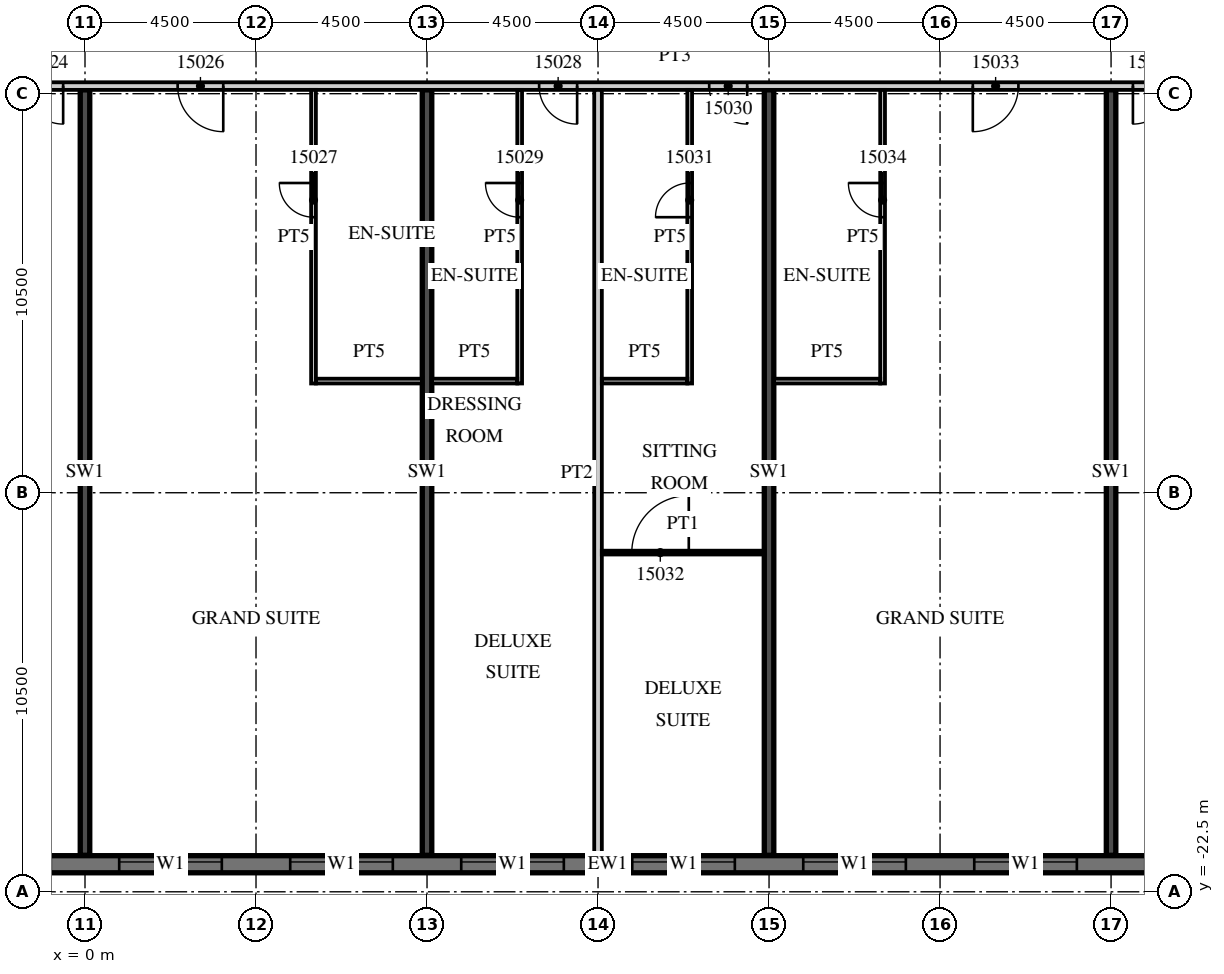
"""IFC4 building model, lengths in metres.
Left out: names, types, materials, properties, quantities, classifications, styles, units other than length and angle.
Written with IfcOpenShell. Run it as: python <this file> out.ifc"""

import sys

from ifc_helpers import new_model, si_unit, direction, frame, frame_2d, origin, place, context, subcontext, project, spatial, rectangle, extrude, element, fill, save


model = new_model("IFC4")
c1 = context("Model", 3, precision=1e-05, world=origin(), true_north=direction((0.0, 1.0)))
c2 = subcontext(c1, "Body", "Model", "MODEL_VIEW")
j1 = project(units=[si_unit("LENGTHUNIT", "METRE"), si_unit("PLANEANGLEUNIT", "RADIAN")], contexts=[c1])
p1 = place(None, origin())
s1 = spatial("IfcSite", under=j1, at=p1, CompositionType="ELEMENT")
p2 = place(p1, origin())
s2 = spatial("IfcBuilding", under=s1, at=p2, CompositionType="ELEMENT")
p3 = place(p2, frame((0.0, 0.0, 79.8)))
s3 = spatial("IfcBuildingStorey", under=s2, at=p3, CompositionType="ELEMENT", Elevation=79.8)
for number, where, z_axis, x_axis in (
    (1, (0.0, -21.54, 0.0), (0.0, 0.0, 1.0), (0.0, 1.0, 0.0)),
    (2, (9.0, -21.54, 0.0), (0.0, 0.0, 1.0), (0.0, 1.0, 0.0)),
    (3, (18.0, -21.54, 0.0), (0.0, 0.0, 1.0), (0.0, 1.0, 0.0)),
    (4, (27.0, -21.54, 0.0), (0.0, 0.0, 1.0), (0.0, 1.0, 0.0)),
):
    element("IfcWall", number, at=place(p3, frame(where, z_axis=z_axis, x_axis=x_axis)), inside=s3, PredefinedType="SHEAR", context=c2, shape_type="SweptSolid", body=[
        extrude(rectangle(XDim=20.14, YDim=0.25, at=frame_2d((10.07, 0.0))), origin(), (0.0, 0.0, 1.0), 3.3),
    ])
p4 = place(p3, frame((-13.5, -21.775, 0.0), z_axis=(0.0, 0.0, 1.0), x_axis=(1.0, 0.0, 0.0)))
e5 = element("IfcWall", 5, at=p4, inside=s3, PredefinedType="SOLIDWALL", context=c2, shape_type="SweptSolid", body=[
    extrude(rectangle(XDim=54.5, YDim=0.45, at=frame_2d((27.25, 0.0))), origin(), (0.0, 0.0, 1.0), 3.02),
])
p5 = place(p4, frame((0.9, 0.0, 0.45)))
e6 = element("IfcOpeningElement", 6, at=p5, cuts=e5, PredefinedType="OPENING", context=c2, shape_type="SweptSolid", body=[
    extrude(rectangle(XDim=2.7, YDim=2.25, at=frame_2d((1.35, 1.125))), frame((0.0, 0.235, 0.0), z_axis=(0.0, -1.0, 0.0), x_axis=(1.0, 0.0, 0.0)), (0.0, 0.0, 1.0), 0.47),
])
p6 = place(p4, frame((5.4, 0.0, 0.45)))
e7 = element("IfcOpeningElement", 7, at=p6, cuts=e5, PredefinedType="OPENING", context=c2, shape_type="SweptSolid", body=[
    extrude(rectangle(XDim=2.7, YDim=2.25, at=frame_2d((1.35, 1.125))), frame((0.0, 0.235, 0.0), z_axis=(0.0, -1.0, 0.0), x_axis=(1.0, 0.0, 0.0)), (0.0, 0.0, 1.0), 0.47),
])
p7 = place(p4, frame((9.9, 0.0, 0.45)))
e8 = element("IfcOpeningElement", 8, at=p7, cuts=e5, PredefinedType="OPENING", context=c2, shape_type="SweptSolid", body=[
    extrude(rectangle(XDim=2.7, YDim=2.25, at=frame_2d((1.35, 1.125))), frame((0.0, 0.235, 0.0), z_axis=(0.0, -1.0, 0.0), x_axis=(1.0, 0.0, 0.0)), (0.0, 0.0, 1.0), 0.47),
])
p8 = place(p4, frame((14.4, 0.0, 0.45)))
e9 = element("IfcOpeningElement", 9, at=p8, cuts=e5, PredefinedType="OPENING", context=c2, shape_type="SweptSolid", body=[
    extrude(rectangle(XDim=2.7, YDim=2.25, at=frame_2d((1.35, 1.125))), frame((0.0, 0.235, 0.0), z_axis=(0.0, -1.0, 0.0), x_axis=(1.0, 0.0, 0.0)), (0.0, 0.0, 1.0), 0.47),
])
p9 = place(p4, frame((18.9, 0.0, 0.45)))
e10 = element("IfcOpeningElement", 10, at=p9, cuts=e5, PredefinedType="OPENING", context=c2, shape_type="SweptSolid", body=[
    extrude(rectangle(XDim=2.7, YDim=2.25, at=frame_2d((1.35, 1.125))), frame((0.0, 0.235, 0.0), z_axis=(0.0, -1.0, 0.0), x_axis=(1.0, 0.0, 0.0)), (0.0, 0.0, 1.0), 0.47),
])
p10 = place(p4, frame((23.4, 0.0, 0.45)))
e11 = element("IfcOpeningElement", 11, at=p10, cuts=e5, PredefinedType="OPENING", context=c2, shape_type="SweptSolid", body=[
    extrude(rectangle(XDim=2.7, YDim=2.25, at=frame_2d((1.35, 1.125))), frame((0.0, 0.235, 0.0), z_axis=(0.0, -1.0, 0.0), x_axis=(1.0, 0.0, 0.0)), (0.0, 0.0, 1.0), 0.47),
])
p11 = place(p4, frame((27.9, 0.0, 0.45)))
e12 = element("IfcOpeningElement", 12, at=p11, cuts=e5, PredefinedType="OPENING", context=c2, shape_type="SweptSolid", body=[
    extrude(rectangle(XDim=2.7, YDim=2.25, at=frame_2d((1.35, 1.125))), frame((0.0, 0.235, 0.0), z_axis=(0.0, -1.0, 0.0), x_axis=(1.0, 0.0, 0.0)), (0.0, 0.0, 1.0), 0.47),
])
p12 = place(p4, frame((32.4, 0.0, 0.45)))
e13 = element("IfcOpeningElement", 13, at=p12, cuts=e5, PredefinedType="OPENING", context=c2, shape_type="SweptSolid", body=[
    extrude(rectangle(XDim=2.7, YDim=2.25, at=frame_2d((1.35, 1.125))), frame((0.0, 0.235, 0.0), z_axis=(0.0, -1.0, 0.0), x_axis=(1.0, 0.0, 0.0)), (0.0, 0.0, 1.0), 0.47),
])
p13 = place(p4, frame((36.9, 0.0, 0.45)))
e14 = element("IfcOpeningElement", 14, at=p13, cuts=e5, PredefinedType="OPENING", context=c2, shape_type="SweptSolid", body=[
    extrude(rectangle(XDim=2.7, YDim=2.25, at=frame_2d((1.35, 1.125))), frame((0.0, 0.235, 0.0), z_axis=(0.0, -1.0, 0.0), x_axis=(1.0, 0.0, 0.0)), (0.0, 0.0, 1.0), 0.47),
])
p14 = place(p4, frame((41.4, 0.0, 0.45)))
e15 = element("IfcOpeningElement", 15, at=p14, cuts=e5, PredefinedType="OPENING", context=c2, shape_type="SweptSolid", body=[
    extrude(rectangle(XDim=2.7, YDim=2.25, at=frame_2d((1.35, 1.125))), frame((0.0, 0.235, 0.0), z_axis=(0.0, -1.0, 0.0), x_axis=(1.0, 0.0, 0.0)), (0.0, 0.0, 1.0), 0.47),
])
p15 = place(p4, frame((45.9, 0.0, 0.45)))
e16 = element("IfcOpeningElement", 16, at=p15, cuts=e5, PredefinedType="OPENING", context=c2, shape_type="SweptSolid", body=[
    extrude(rectangle(XDim=2.7, YDim=2.25, at=frame_2d((1.35, 1.125))), frame((0.0, 0.235, 0.0), z_axis=(0.0, -1.0, 0.0), x_axis=(1.0, 0.0, 0.0)), (0.0, 0.0, 1.0), 0.47),
])
p16 = place(p4, frame((50.4, 0.0, 0.45)))
e17 = element("IfcOpeningElement", 17, at=p16, cuts=e5, PredefinedType="OPENING", context=c2, shape_type="SweptSolid", body=[
    extrude(rectangle(XDim=2.7, YDim=2.25, at=frame_2d((1.35, 1.125))), frame((0.0, 0.235, 0.0), z_axis=(0.0, -1.0, 0.0), x_axis=(1.0, 0.0, 0.0)), (0.0, 0.0, 1.0), 0.47),
])
p17 = place(p3, frame((-13.5, -1.3, 0.0), z_axis=(0.0, 0.0, 1.0), x_axis=(1.0, 0.0, 0.0)))
e18 = element("IfcWall", 18, at=p17, inside=s3, PredefinedType="PARTITIONING", context=c2, shape_type="SweptSolid", body=[
    extrude(rectangle(XDim=58.05, YDim=0.2, at=frame_2d((29.025, 0.0))), origin(), (0.0, 0.0, 1.0), 3.02),
])
p18 = place(p17, frame((2.925, 0.0, 0.0)))
e19 = element("IfcOpeningElement", 19, at=p18, cuts=e18, PredefinedType="OPENING", context=c2, shape_type="SweptSolid", body=[
    extrude(rectangle(XDim=1.0, YDim=2.1, at=frame_2d((0.5, 1.05))), frame((0.0, 0.11, 0.0), z_axis=(0.0, -1.0, 0.0), x_axis=(1.0, 0.0, 0.0)), (0.0, 0.0, 1.0), 0.22),
])
p19 = place(p17, frame((7.45, 0.0, 0.0)))
e20 = element("IfcOpeningElement", 20, at=p19, cuts=e18, PredefinedType="OPENING", context=c2, shape_type="SweptSolid", body=[
    extrude(rectangle(XDim=1.0, YDim=2.1, at=frame_2d((0.5, 1.05))), frame((0.0, 0.11, 0.0), z_axis=(0.0, -1.0, 0.0), x_axis=(1.0, 0.0, 0.0)), (0.0, 0.0, 1.0), 0.22),
])
p20 = place(p17, frame((11.925, 0.0, 0.0)))
e21 = element("IfcOpeningElement", 21, at=p20, cuts=e18, PredefinedType="OPENING", context=c2, shape_type="SweptSolid", body=[
    extrude(rectangle(XDim=1.0, YDim=2.1, at=frame_2d((0.5, 1.05))), frame((0.0, 0.11, 0.0), z_axis=(0.0, -1.0, 0.0), x_axis=(1.0, 0.0, 0.0)), (0.0, 0.0, 1.0), 0.22),
])
p21 = place(p17, frame((15.938, 0.0, 0.0)))
e22 = element("IfcOpeningElement", 22, at=p21, cuts=e18, PredefinedType="OPENING", context=c2, shape_type="SweptSolid", body=[
    extrude(rectangle(XDim=1.2, YDim=2.1, at=frame_2d((0.6, 1.05))), frame((0.0, 0.11, 0.0), z_axis=(0.0, -1.0, 0.0), x_axis=(1.0, 0.0, 0.0)), (0.0, 0.0, 1.0), 0.22),
])
p22 = place(p17, frame((25.45, 0.0, 0.0)))
e23 = element("IfcOpeningElement", 23, at=p22, cuts=e18, PredefinedType="OPENING", context=c2, shape_type="SweptSolid", body=[
    extrude(rectangle(XDim=1.0, YDim=2.1, at=frame_2d((0.5, 1.05))), frame((0.0, 0.11, 0.0), z_axis=(0.0, -1.0, 0.0), x_axis=(1.0, 0.0, 0.0)), (0.0, 0.0, 1.0), 0.22),
])
p23 = place(p17, frame((29.925, 0.0, 0.0)))
e24 = element("IfcOpeningElement", 24, at=p23, cuts=e18, PredefinedType="OPENING", context=c2, shape_type="SweptSolid", body=[
    extrude(rectangle(XDim=1.0, YDim=2.1, at=frame_2d((0.5, 1.05))), frame((0.0, 0.11, 0.0), z_axis=(0.0, -1.0, 0.0), x_axis=(1.0, 0.0, 0.0)), (0.0, 0.0, 1.0), 0.22),
])
p24 = place(p17, frame((36.862, 0.0, 0.0)))
e25 = element("IfcOpeningElement", 25, at=p24, cuts=e18, PredefinedType="OPENING", context=c2, shape_type="SweptSolid", body=[
    extrude(rectangle(XDim=1.2, YDim=2.1, at=frame_2d((0.6, 1.05))), frame((0.0, 0.11, 0.0), z_axis=(0.0, -1.0, 0.0), x_axis=(1.0, 0.0, 0.0)), (0.0, 0.0, 1.0), 0.22),
])
p25 = place(p17, frame((41.075, 0.0, 0.0)))
e26 = element("IfcOpeningElement", 26, at=p25, cuts=e18, PredefinedType="OPENING", context=c2, shape_type="SweptSolid", body=[
    extrude(rectangle(XDim=1.0, YDim=2.1, at=frame_2d((0.5, 1.05))), frame((0.0, 0.11, 0.0), z_axis=(0.0, -1.0, 0.0), x_axis=(1.0, 0.0, 0.0)), (0.0, 0.0, 1.0), 0.22),
])
p26 = place(p17, frame((45.55, 0.0, 0.0)))
e27 = element("IfcOpeningElement", 27, at=p26, cuts=e18, PredefinedType="OPENING", context=c2, shape_type="SweptSolid", body=[
    extrude(rectangle(XDim=1.0, YDim=2.1, at=frame_2d((0.5, 1.05))), frame((0.0, 0.11, 0.0), z_axis=(0.0, -1.0, 0.0), x_axis=(1.0, 0.0, 0.0)), (0.0, 0.0, 1.0), 0.22),
])
p27 = place(p17, frame((52.425, 0.0, 0.0)))
e28 = element("IfcOpeningElement", 28, at=p27, cuts=e18, PredefinedType="OPENING", context=c2, shape_type="SweptSolid", body=[
    extrude(rectangle(XDim=1.0, YDim=2.1, at=frame_2d((0.5, 1.05))), frame((0.0, 0.11, 0.0), z_axis=(0.0, -1.0, 0.0), x_axis=(1.0, 0.0, 0.0)), (0.0, 0.0, 1.0), 0.22),
])
p28 = place(p17, frame((56.525, 0.0, 0.0)))
e29 = element("IfcOpeningElement", 29, at=p28, cuts=e18, PredefinedType="OPENING", context=c2, shape_type="SweptSolid", body=[
    extrude(rectangle(XDim=1.0, YDim=2.1, at=frame_2d((0.5, 1.05))), frame((0.0, 0.11, 0.0), z_axis=(0.0, -1.0, 0.0), x_axis=(1.0, 0.0, 0.0)), (0.0, 0.0, 1.0), 0.22),
])
p29 = place(p3, frame((6.013, -9.125, 0.0), z_axis=(0.0, 0.0, 1.0), x_axis=(0.0, 1.0, 0.0)))
e30 = element("IfcWall", 30, at=p29, inside=s3, PredefinedType="PARTITIONING", context=c2, shape_type="SweptSolid", body=[
    extrude(rectangle(XDim=7.725, YDim=0.125, at=frame_2d((3.863, 0.0))), origin(), (0.0, 0.0, 1.0), 3.02),
])
p30 = place(p29, frame((4.375, 0.0, 0.0)))
e31 = element("IfcOpeningElement", 31, at=p30, cuts=e30, PredefinedType="OPENING", context=c2, shape_type="SweptSolid", body=[
    extrude(rectangle(XDim=0.9, YDim=2.1, at=frame_2d((0.45, 1.05))), frame((0.0, 0.073, 0.0), z_axis=(0.0, -1.0, 0.0), x_axis=(1.0, 0.0, 0.0)), (0.0, 0.0, 1.0), 0.145),
])
p31 = place(p3, frame((6.075, -9.062, 0.0), z_axis=(0.0, 0.0, 1.0), x_axis=(1.0, 0.0, 0.0)))
e32 = element("IfcWall", 32, at=p31, inside=s3, PredefinedType="PARTITIONING", context=c2, shape_type="SweptSolid", body=[
    extrude(rectangle(XDim=2.8, YDim=0.125, at=frame_2d((1.4, 0.0))), origin(), (0.0, 0.0, 1.0), 3.02),
])
p32 = place(p3, frame((13.5, -21.55, 0.0), z_axis=(0.0, 0.0, 1.0), x_axis=(0.0, 1.0, 0.0)))
e33 = element("IfcWall", 33, at=p32, inside=s3, PredefinedType="PARTITIONING", context=c2, shape_type="SweptSolid", body=[
    extrude(rectangle(XDim=20.15, YDim=0.2, at=frame_2d((10.075, 0.0))), origin(), (0.0, 0.0, 1.0), 3.02),
])
p33 = place(p3, frame((11.438, -9.125, 0.0), z_axis=(0.0, 0.0, 1.0), x_axis=(0.0, 1.0, 0.0)))
e34 = element("IfcWall", 34, at=p33, inside=s3, PredefinedType="PARTITIONING", context=c2, shape_type="SweptSolid", body=[
    extrude(rectangle(XDim=7.725, YDim=0.125, at=frame_2d((3.863, 0.0))), origin(), (0.0, 0.0, 1.0), 3.02),
])
p34 = place(p33, frame((4.375, 0.0, 0.0)))
e35 = element("IfcOpeningElement", 35, at=p34, cuts=e34, PredefinedType="OPENING", context=c2, shape_type="SweptSolid", body=[
    extrude(rectangle(XDim=0.9, YDim=2.1, at=frame_2d((0.45, 1.05))), frame((0.0, 0.073, 0.0), z_axis=(0.0, -1.0, 0.0), x_axis=(1.0, 0.0, 0.0)), (0.0, 0.0, 1.0), 0.145),
])
p35 = place(p3, frame((9.125, -9.062, 0.0), z_axis=(0.0, 0.0, 1.0), x_axis=(1.0, 0.0, 0.0)))
e36 = element("IfcWall", 36, at=p35, inside=s3, PredefinedType="PARTITIONING", context=c2, shape_type="SweptSolid", body=[
    extrude(rectangle(XDim=2.25, YDim=0.125, at=frame_2d((1.125, 0.0))), origin(), (0.0, 0.0, 1.0), 3.02),
])
p36 = place(p3, frame((15.912, -9.125, 0.0), z_axis=(0.0, 0.0, 1.0), x_axis=(0.0, 1.0, 0.0)))
e37 = element("IfcWall", 37, at=p36, inside=s3, PredefinedType="PARTITIONING", context=c2, shape_type="SweptSolid", body=[
    extrude(rectangle(XDim=7.725, YDim=0.125, at=frame_2d((3.863, 0.0))), origin(), (0.0, 0.0, 1.0), 3.02),
])
p37 = place(p36, frame((4.375, 0.0, 0.0)))
e38 = element("IfcOpeningElement", 38, at=p37, cuts=e37, PredefinedType="OPENING", context=c2, shape_type="SweptSolid", body=[
    extrude(rectangle(XDim=0.9, YDim=2.1, at=frame_2d((0.45, 1.05))), frame((0.0, 0.073, 0.0), z_axis=(0.0, -1.0, 0.0), x_axis=(1.0, 0.0, 0.0)), (0.0, 0.0, 1.0), 0.145),
])
p38 = place(p3, frame((13.6, -9.062, 0.0), z_axis=(0.0, 0.0, 1.0), x_axis=(1.0, 0.0, 0.0)))
e39 = element("IfcWall", 39, at=p38, inside=s3, PredefinedType="PARTITIONING", context=c2, shape_type="SweptSolid", body=[
    extrude(rectangle(XDim=2.25, YDim=0.125, at=frame_2d((1.125, 0.0))), origin(), (0.0, 0.0, 1.0), 3.02),
])
p39 = place(p3, frame((13.6, -13.575, 0.0), z_axis=(0.0, 0.0, 1.0), x_axis=(1.0, 0.0, 0.0)))
e40 = element("IfcWall", 40, at=p39, inside=s3, PredefinedType="PARTITIONING", context=c2, shape_type="SweptSolid", body=[
    extrude(rectangle(XDim=4.275, YDim=0.1, at=frame_2d((2.137, 0.0))), origin(), (0.0, 0.0, 1.0), 3.02),
])
p40 = place(p39, frame((0.788, 0.0, 0.0)))
e41 = element("IfcOpeningElement", 41, at=p40, cuts=e40, PredefinedType="OPENING", context=c2, shape_type="SweptSolid", body=[
    extrude(rectangle(XDim=1.5, YDim=2.1, at=frame_2d((0.75, 1.05))), frame((0.0, 0.06, 0.0), z_axis=(0.0, -1.0, 0.0), x_axis=(1.0, 0.0, 0.0)), (0.0, 0.0, 1.0), 0.12),
])
p41 = place(p3, frame((20.988, -9.125, 0.0), z_axis=(0.0, 0.0, 1.0), x_axis=(0.0, 1.0, 0.0)))
e42 = element("IfcWall", 42, at=p41, inside=s3, PredefinedType="PARTITIONING", context=c2, shape_type="SweptSolid", body=[
    extrude(rectangle(XDim=7.725, YDim=0.125, at=frame_2d((3.863, 0.0))), origin(), (0.0, 0.0, 1.0), 3.02),
])
p42 = place(p41, frame((4.375, 0.0, 0.0)))
e43 = element("IfcOpeningElement", 43, at=p42, cuts=e42, PredefinedType="OPENING", context=c2, shape_type="SweptSolid", body=[
    extrude(rectangle(XDim=0.9, YDim=2.1, at=frame_2d((0.45, 1.05))), frame((0.0, 0.073, 0.0), z_axis=(0.0, -1.0, 0.0), x_axis=(1.0, 0.0, 0.0)), (0.0, 0.0, 1.0), 0.145),
])
p43 = place(p3, frame((18.125, -9.062, 0.0), z_axis=(0.0, 0.0, 1.0), x_axis=(1.0, 0.0, 0.0)))
e44 = element("IfcWall", 44, at=p43, inside=s3, PredefinedType="PARTITIONING", context=c2, shape_type="SweptSolid", body=[
    extrude(rectangle(XDim=2.8, YDim=0.125, at=frame_2d((1.4, 0.0))), origin(), (0.0, 0.0, 1.0), 3.02),
])
p44 = place(p8, origin())
e45 = element("IfcWindow", 45, at=p44, inside=s3, PartitioningType="SINGLE_PANEL", PredefinedType="WINDOW", context=c2, shape_type="SweptSolid", body=[
    extrude(rectangle(XDim=2.7, YDim=2.25, at=frame_2d((1.35, 1.125))), frame((0.0, 0.09, 0.0), z_axis=(0.0, -1.0, 0.0), x_axis=(1.0, 0.0, 0.0)), (0.0, 0.0, 1.0), 0.06),
])
fill(e9, e45)
p45 = place(p9, origin())
e46 = element("IfcWindow", 46, at=p45, inside=s3, PartitioningType="SINGLE_PANEL", PredefinedType="WINDOW", context=c2, shape_type="SweptSolid", body=[
    extrude(rectangle(XDim=2.7, YDim=2.25, at=frame_2d((1.35, 1.125))), frame((0.0, 0.09, 0.0), z_axis=(0.0, -1.0, 0.0), x_axis=(1.0, 0.0, 0.0)), (0.0, 0.0, 1.0), 0.06),
])
fill(e10, e46)
p46 = place(p10, origin())
e47 = element("IfcWindow", 47, at=p46, inside=s3, PartitioningType="SINGLE_PANEL", PredefinedType="WINDOW", context=c2, shape_type="SweptSolid", body=[
    extrude(rectangle(XDim=2.7, YDim=2.25, at=frame_2d((1.35, 1.125))), frame((0.0, 0.09, 0.0), z_axis=(0.0, -1.0, 0.0), x_axis=(1.0, 0.0, 0.0)), (0.0, 0.0, 1.0), 0.06),
])
fill(e11, e47)
p47 = place(p11, origin())
e48 = element("IfcWindow", 48, at=p47, inside=s3, PartitioningType="SINGLE_PANEL", PredefinedType="WINDOW", context=c2, shape_type="SweptSolid", body=[
    extrude(rectangle(XDim=2.7, YDim=2.25, at=frame_2d((1.35, 1.125))), frame((0.0, 0.09, 0.0), z_axis=(0.0, -1.0, 0.0), x_axis=(1.0, 0.0, 0.0)), (0.0, 0.0, 1.0), 0.06),
])
fill(e12, e48)
p48 = place(p12, origin())
e49 = element("IfcWindow", 49, at=p48, inside=s3, PartitioningType="SINGLE_PANEL", PredefinedType="WINDOW", context=c2, shape_type="SweptSolid", body=[
    extrude(rectangle(XDim=2.7, YDim=2.25, at=frame_2d((1.35, 1.125))), frame((0.0, 0.09, 0.0), z_axis=(0.0, -1.0, 0.0), x_axis=(1.0, 0.0, 0.0)), (0.0, 0.0, 1.0), 0.06),
])
fill(e13, e49)
p49 = place(p13, origin())
e50 = element("IfcWindow", 50, at=p49, inside=s3, PartitioningType="SINGLE_PANEL", PredefinedType="WINDOW", context=c2, shape_type="SweptSolid", body=[
    extrude(rectangle(XDim=2.7, YDim=2.25, at=frame_2d((1.35, 1.125))), frame((0.0, 0.09, 0.0), z_axis=(0.0, -1.0, 0.0), x_axis=(1.0, 0.0, 0.0)), (0.0, 0.0, 1.0), 0.06),
])
fill(e14, e50)
p50 = place(p20, origin())
e51 = element("IfcDoor", 51, at=p50, inside=s3, OperationType="SINGLE_SWING_RIGHT", PredefinedType="DOOR", context=c2, shape_type="SweptSolid", body=[
    extrude(rectangle(XDim=1.0, YDim=2.1, at=frame_2d((0.5, 1.05))), frame((0.0, 0.025, 0.0), z_axis=(0.0, -1.0, 0.0), x_axis=(1.0, 0.0, 0.0)), (0.0, 0.0, 1.0), 0.05),
])
fill(e21, e51)
p51 = place(p21, origin())
e52 = element("IfcDoor", 52, at=p51, inside=s3, OperationType="SINGLE_SWING_RIGHT", PredefinedType="DOOR", context=c2, shape_type="SweptSolid", body=[
    extrude(rectangle(XDim=1.2, YDim=2.1, at=frame_2d((0.6, 1.05))), frame((0.0, 0.025, 0.0), z_axis=(0.0, -1.0, 0.0), x_axis=(1.0, 0.0, 0.0)), (0.0, 0.0, 1.0), 0.05),
])
fill(e22, e52)
p52 = place(p30, origin())
e53 = element("IfcDoor", 53, at=p52, inside=s3, OperationType="SINGLE_SWING_RIGHT", PredefinedType="DOOR", context=c2, shape_type="SweptSolid", body=[
    extrude(rectangle(XDim=0.9, YDim=2.1, at=frame_2d((0.45, 1.05))), frame((0.0, 0.025, 0.0), z_axis=(0.0, -1.0, 0.0), x_axis=(1.0, 0.0, 0.0)), (0.0, 0.0, 1.0), 0.05),
])
fill(e31, e53)
p53 = place(p22, origin())
e54 = element("IfcDoor", 54, at=p53, inside=s3, OperationType="SINGLE_SWING_RIGHT", PredefinedType="DOOR", context=c2, shape_type="SweptSolid", body=[
    extrude(rectangle(XDim=1.0, YDim=2.1, at=frame_2d((0.5, 1.05))), frame((0.0, 0.025, 0.0), z_axis=(0.0, -1.0, 0.0), x_axis=(1.0, 0.0, 0.0)), (0.0, 0.0, 1.0), 0.05),
])
fill(e23, e54)
p54 = place(p34, origin())
e55 = element("IfcDoor", 55, at=p54, inside=s3, OperationType="SINGLE_SWING_RIGHT", PredefinedType="DOOR", context=c2, shape_type="SweptSolid", body=[
    extrude(rectangle(XDim=0.9, YDim=2.1, at=frame_2d((0.45, 1.05))), frame((0.0, 0.025, 0.0), z_axis=(0.0, -1.0, 0.0), x_axis=(1.0, 0.0, 0.0)), (0.0, 0.0, 1.0), 0.05),
])
fill(e35, e55)
p55 = place(p23, origin())
e56 = element("IfcDoor", 56, at=p55, inside=s3, OperationType="SINGLE_SWING_RIGHT", PredefinedType="DOOR", context=c2, shape_type="SweptSolid", body=[
    extrude(rectangle(XDim=1.0, YDim=2.1, at=frame_2d((0.5, 1.05))), frame((0.0, 0.025, 0.0), z_axis=(0.0, -1.0, 0.0), x_axis=(1.0, 0.0, 0.0)), (0.0, 0.0, 1.0), 0.05),
])
fill(e24, e56)
p56 = place(p37, origin())
e57 = element("IfcDoor", 57, at=p56, inside=s3, OperationType="SINGLE_SWING_LEFT", PredefinedType="DOOR", context=c2, shape_type="SweptSolid", body=[
    extrude(rectangle(XDim=0.9, YDim=2.1, at=frame_2d((0.45, 1.05))), frame((0.0, 0.025, 0.0), z_axis=(0.0, -1.0, 0.0), x_axis=(1.0, 0.0, 0.0)), (0.0, 0.0, 1.0), 0.05),
])
fill(e38, e57)
p57 = place(p40, origin())
e58 = element("IfcDoor", 58, at=p57, inside=s3, OperationType="SINGLE_SWING_RIGHT", PredefinedType="DOOR", context=c2, shape_type="SweptSolid", body=[
    extrude(rectangle(XDim=1.5, YDim=2.1, at=frame_2d((0.75, 1.05))), frame((0.0, 0.025, 0.0), z_axis=(0.0, -1.0, 0.0), x_axis=(1.0, 0.0, 0.0)), (0.0, 0.0, 1.0), 0.05),
])
fill(e41, e58)
p58 = place(p24, origin())
e59 = element("IfcDoor", 59, at=p58, inside=s3, OperationType="SINGLE_SWING_LEFT", PredefinedType="DOOR", context=c2, shape_type="SweptSolid", body=[
    extrude(rectangle(XDim=1.2, YDim=2.1, at=frame_2d((0.6, 1.05))), frame((0.0, 0.025, 0.0), z_axis=(0.0, -1.0, 0.0), x_axis=(1.0, 0.0, 0.0)), (0.0, 0.0, 1.0), 0.05),
])
fill(e25, e59)
p59 = place(p42, origin())
e60 = element("IfcDoor", 60, at=p59, inside=s3, OperationType="SINGLE_SWING_RIGHT", PredefinedType="DOOR", context=c2, shape_type="SweptSolid", body=[
    extrude(rectangle(XDim=0.9, YDim=2.1, at=frame_2d((0.45, 1.05))), frame((0.0, 0.025, 0.0), z_axis=(0.0, -1.0, 0.0), x_axis=(1.0, 0.0, 0.0)), (0.0, 0.0, 1.0), 0.05),
])
fill(e43, e60)
p60 = place(p25, origin())
e61 = element("IfcDoor", 61, at=p60, inside=s3, OperationType="SINGLE_SWING_LEFT", PredefinedType="DOOR", context=c2, shape_type="SweptSolid", body=[
    extrude(rectangle(XDim=1.0, YDim=2.1, at=frame_2d((0.5, 1.05))), frame((0.0, 0.025, 0.0), z_axis=(0.0, -1.0, 0.0), x_axis=(1.0, 0.0, 0.0)), (0.0, 0.0, 1.0), 0.05),
])
fill(e26, e61)
save(model, sys.argv[1])
